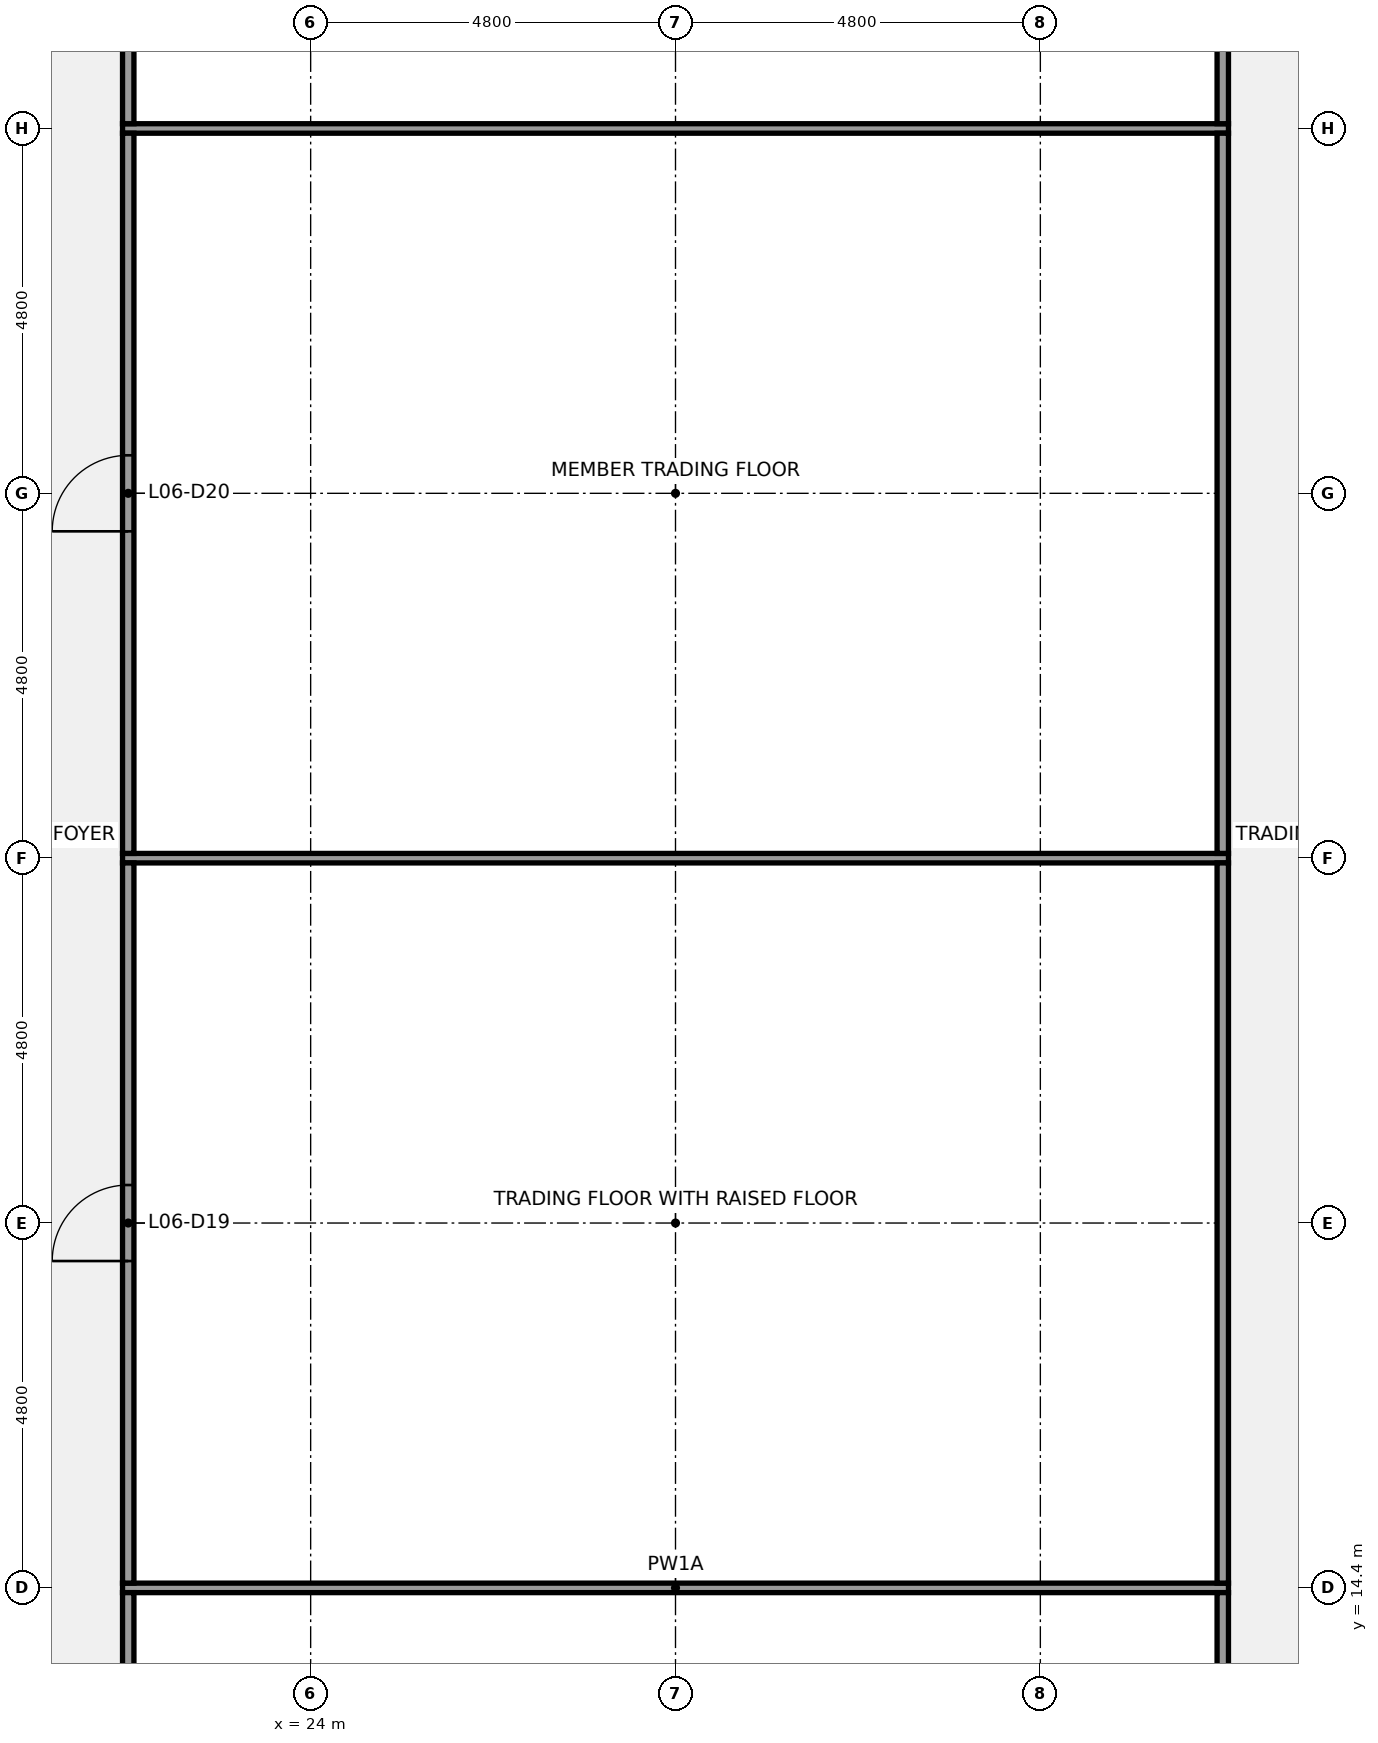
"""IFC4 building model, lengths in metres.
Left out: names, types, materials, properties, quantities, classifications, styles, units other than length and angle.
Written with IfcOpenShell. Run it as: python <this file> out.ifc"""

import sys

from ifc_helpers import new_model, si_unit, direction, frame, frame_2d, origin, place, context, subcontext, project, spatial, rectangle, extrude, element, fill, save


model = new_model("IFC4")
c1 = context("Model", 3, precision=1e-05, world=origin(), true_north=direction((0.0, 1.0)))
c2 = subcontext(c1, "Body", "Model", "MODEL_VIEW")
j1 = project(units=[si_unit("LENGTHUNIT", "METRE"), si_unit("PLANEANGLEUNIT", "RADIAN")], contexts=[c1])
p1 = place(None, origin())
s1 = spatial("IfcSite", under=j1, at=p1, CompositionType="ELEMENT")
p2 = place(p1, origin())
s2 = spatial("IfcBuilding", under=s1, at=p2, CompositionType="ELEMENT")
p3 = place(p2, frame((0.0, 0.0, 34.6)))
s3 = spatial("IfcBuildingStorey", under=s2, at=p3, CompositionType="ELEMENT", Elevation=34.6)
for number, where, z_axis, x_axis in (
    (1, (21.525, 14.4, 0.0), (0.0, 0.0, 1.0), (1.0, 0.0, 0.0)),
    (2, (21.525, 24.0, 0.0), (0.0, 0.0, 1.0), (1.0, 0.0, 0.0)),
    (3, (21.525, 33.6, 0.0), (0.0, 0.0, 1.0), (1.0, 0.0, 0.0)),
):
    element("IfcWall", number, at=place(p3, frame(where, z_axis=z_axis, x_axis=x_axis)), inside=s3, PredefinedType="PARTITIONING", context=c2, shape_type="SweptSolid", body=[
        extrude(rectangle(XDim=14.55, YDim=0.125, at=frame_2d((7.275, 0.0))), origin(), (0.0, 0.0, 1.0), 3.27),
    ])
p4 = place(p3, frame((21.6, 7.275, 0.0), z_axis=(0.0, 0.0, 1.0), x_axis=(0.0, 1.0, 0.0)))
e4 = element("IfcWall", 4, at=p4, inside=s3, PredefinedType="PARTITIONING", context=c2, shape_type="SweptSolid", body=[
    extrude(rectangle(XDim=7.062, YDim=0.15, at=frame_2d((3.531, 0.0))), origin(), (0.0, 0.0, 1.0), 3.27),
])
p5 = place(p3, frame((21.6, 14.462, 0.0), z_axis=(0.0, 0.0, 1.0), x_axis=(0.0, 1.0, 0.0)))
e5 = element("IfcWall", 5, at=p5, inside=s3, PredefinedType="PARTITIONING", context=c2, shape_type="SweptSolid", body=[
    extrude(rectangle(XDim=9.475, YDim=0.15, at=frame_2d((4.738, 0.0))), origin(), (0.0, 0.0, 1.0), 3.27),
])
p6 = place(p5, frame((4.238, 0.0, 0.0)))
e6 = element("IfcOpeningElement", 6, at=p6, cuts=e5, PredefinedType="OPENING", context=c2, shape_type="SweptSolid", body=[
    extrude(rectangle(XDim=1.0, YDim=2.1, at=frame_2d((0.5, 1.05))), frame((0.0, 0.085, 0.0), z_axis=(0.0, -1.0, 0.0), x_axis=(1.0, 0.0, 0.0)), (0.0, 0.0, 1.0), 0.17),
])
p7 = place(p3, frame((21.6, 24.062, 0.0), z_axis=(0.0, 0.0, 1.0), x_axis=(0.0, 1.0, 0.0)))
e7 = element("IfcWall", 7, at=p7, inside=s3, PredefinedType="PARTITIONING", context=c2, shape_type="SweptSolid", body=[
    extrude(rectangle(XDim=9.475, YDim=0.15, at=frame_2d((4.738, 0.0))), origin(), (0.0, 0.0, 1.0), 3.27),
])
p8 = place(p7, frame((4.238, 0.0, 0.0)))
e8 = element("IfcOpeningElement", 8, at=p8, cuts=e7, PredefinedType="OPENING", context=c2, shape_type="SweptSolid", body=[
    extrude(rectangle(XDim=1.0, YDim=2.1, at=frame_2d((0.5, 1.05))), frame((0.0, 0.085, 0.0), z_axis=(0.0, -1.0, 0.0), x_axis=(1.0, 0.0, 0.0)), (0.0, 0.0, 1.0), 0.17),
])
p9 = place(p3, frame((21.6, 33.663, 0.0), z_axis=(0.0, 0.0, 1.0), x_axis=(0.0, 1.0, 0.0)))
e9 = element("IfcWall", 9, at=p9, inside=s3, PredefinedType="PARTITIONING", context=c2, shape_type="SweptSolid", body=[
    extrude(rectangle(XDim=4.675, YDim=0.15, at=frame_2d((2.337, 0.0))), origin(), (0.0, 0.0, 1.0), 3.27),
])
p10 = place(p9, frame((1.837, 0.0, 0.0)))
e10 = element("IfcOpeningElement", 10, at=p10, cuts=e9, PredefinedType="OPENING", context=c2, shape_type="SweptSolid", body=[
    extrude(rectangle(XDim=1.0, YDim=2.1, at=frame_2d((0.5, 1.05))), frame((0.0, 0.085, 0.0), z_axis=(0.0, -1.0, 0.0), x_axis=(1.0, 0.0, 0.0)), (0.0, 0.0, 1.0), 0.17),
])
p11 = place(p3, frame((36.0, 7.275, 0.0), z_axis=(0.0, 0.0, 1.0), x_axis=(0.0, 1.0, 0.0)))
e11 = element("IfcWall", 11, at=p11, inside=s3, PredefinedType="PARTITIONING", context=c2, shape_type="SweptSolid", body=[
    extrude(rectangle(XDim=7.062, YDim=0.15, at=frame_2d((3.531, 0.0))), origin(), (0.0, 0.0, 1.0), 3.27),
])
for number, where, z_axis, x_axis in (
    (12, (36.0, 14.462, 0.0), (0.0, 0.0, 1.0), (0.0, 1.0, 0.0)),
    (13, (36.0, 24.062, 0.0), (0.0, 0.0, 1.0), (0.0, 1.0, 0.0)),
):
    element("IfcWall", number, at=place(p3, frame(where, z_axis=z_axis, x_axis=x_axis)), inside=s3, PredefinedType="PARTITIONING", context=c2, shape_type="SweptSolid", body=[
        extrude(rectangle(XDim=9.475, YDim=0.15, at=frame_2d((4.738, 0.0))), origin(), (0.0, 0.0, 1.0), 3.27),
    ])
p12 = place(p3, frame((36.0, 33.663, 0.0), z_axis=(0.0, 0.0, 1.0), x_axis=(0.0, 1.0, 0.0)))
e14 = element("IfcWall", 14, at=p12, inside=s3, PredefinedType="PARTITIONING", context=c2, shape_type="SweptSolid", body=[
    extrude(rectangle(XDim=4.675, YDim=0.15, at=frame_2d((2.337, 0.0))), origin(), (0.0, 0.0, 1.0), 3.27),
])
p13 = place(p6, origin())
e15 = element("IfcDoor", 15, at=p13, inside=s3, OperationType="SINGLE_SWING_LEFT", PredefinedType="DOOR", context=c2, shape_type="SweptSolid", body=[
    extrude(rectangle(XDim=1.0, YDim=2.1, at=frame_2d((0.5, 1.05))), frame((0.0, 0.025, 0.0), z_axis=(0.0, -1.0, 0.0), x_axis=(1.0, 0.0, 0.0)), (0.0, 0.0, 1.0), 0.05),
])
fill(e6, e15)
p14 = place(p8, origin())
e16 = element("IfcDoor", 16, at=p14, inside=s3, OperationType="SINGLE_SWING_LEFT", PredefinedType="DOOR", context=c2, shape_type="SweptSolid", body=[
    extrude(rectangle(XDim=1.0, YDim=2.1, at=frame_2d((0.5, 1.05))), frame((0.0, 0.025, 0.0), z_axis=(0.0, -1.0, 0.0), x_axis=(1.0, 0.0, 0.0)), (0.0, 0.0, 1.0), 0.05),
])
fill(e8, e16)
save(model, sys.argv[1])
